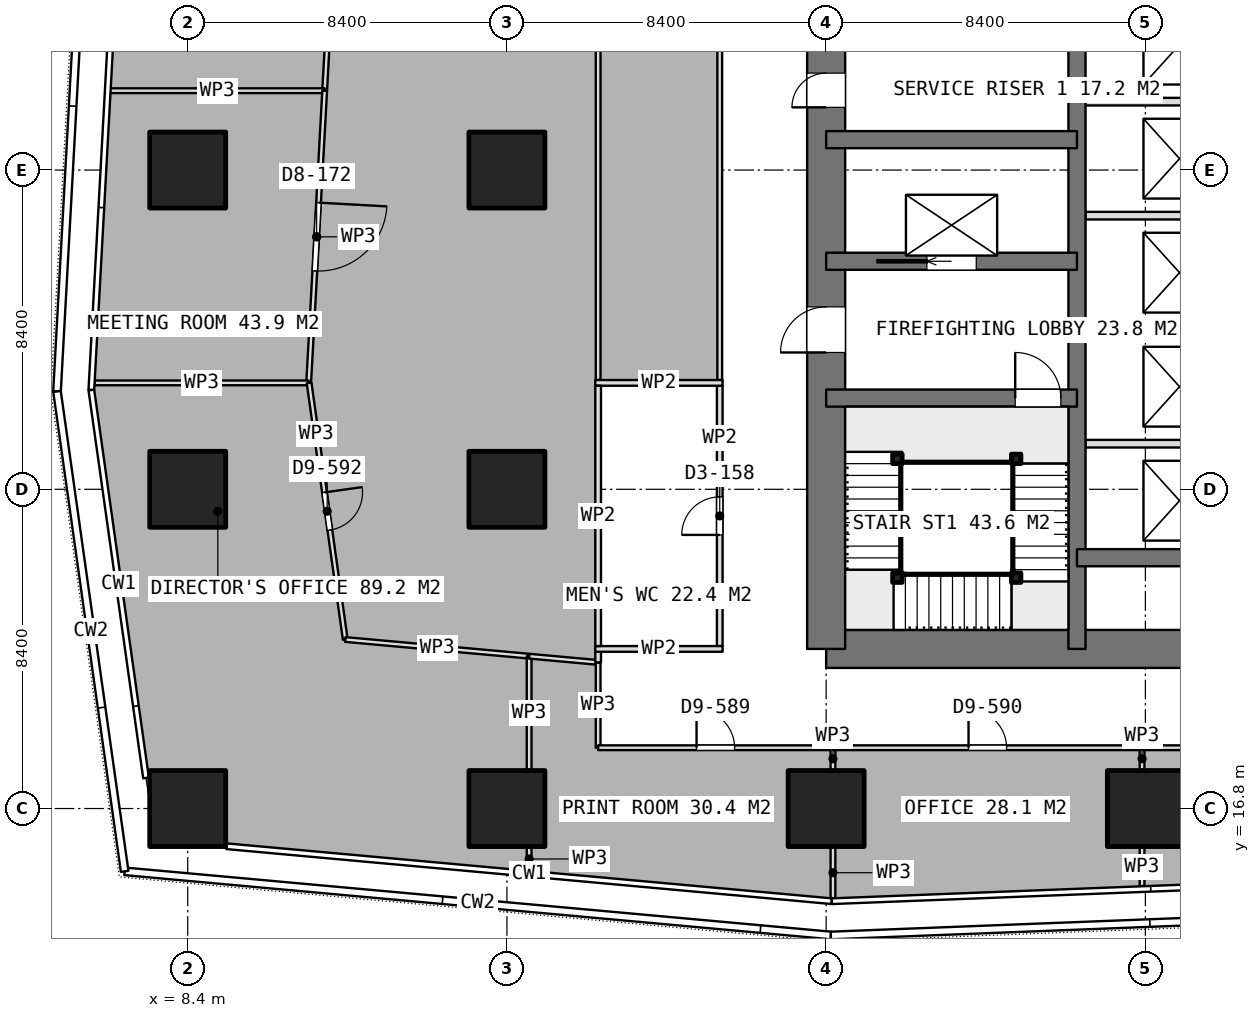
"""IFC4 building model, lengths in metres.
Left out: names, types, materials, properties, quantities, classifications, styles, units other than length and angle.
Written with IfcOpenShell. Run it as: python <this file> out.ifc"""

import sys

from ifc_helpers import new_model, si_unit, direction, frame, frame_2d, origin, origin_2d, place, context, subcontext, project, spatial, rectangle, extrude, element, fill, save


model = new_model("IFC4")
c1 = context("Model", 3, precision=1e-05, world=origin(), true_north=direction((0.0, 1.0)))
c2 = subcontext(c1, "Body", "Model", "MODEL_VIEW")
j1 = project(units=[si_unit("LENGTHUNIT", "METRE"), si_unit("PLANEANGLEUNIT", "RADIAN")], contexts=[c1])
p1 = place(None, origin())
s1 = spatial("IfcSite", under=j1, at=p1, CompositionType="ELEMENT")
p2 = place(p1, origin())
s2 = spatial("IfcBuilding", under=s1, at=p2, CompositionType="ELEMENT")
p3 = place(p2, frame((0.0, 0.0, 147.8)))
s3 = spatial("IfcBuildingStorey", under=s2, at=p3, CompositionType="ELEMENT", Elevation=147.8)
p4 = place(p3, frame((25.2, 21.0, 0.0), z_axis=(0.0, 0.0, 1.0), x_axis=(1.0, 0.0, 0.0)))
e1 = element("IfcWall", 1, at=p4, inside=s3, PredefinedType="SHEAR", context=c2, shape_type="SweptSolid", body=[
    extrude(rectangle(XDim=10.4, YDim=1.0, at=frame_2d((5.2, 0.0))), origin(), (0.0, 0.0, 1.0), 3.75),
])
p5 = place(p3, frame((25.2, 21.0, 0.0), z_axis=(0.0, 0.0, 1.0), x_axis=(0.0, 1.0, 0.0)))
e2 = element("IfcWall", 2, at=p5, inside=s3, PredefinedType="SHEAR", context=c2, shape_type="SweptSolid", body=[
    extrude(rectangle(XDim=25.2, YDim=1.0, at=frame_2d((12.6, 0.0))), origin(), (0.0, 0.0, 1.0), 3.75),
])
p6 = place(p5, frame((7.8, 0.0, 0.0)))
e3 = element("IfcOpeningElement", 3, at=p6, cuts=e2, PredefinedType="OPENING", context=c2, shape_type="SweptSolid", body=[
    extrude(rectangle(XDim=1.2, YDim=2.1, at=frame_2d((0.6, 1.05))), frame((0.0, 0.51, 0.0), z_axis=(0.0, -1.0, 0.0), x_axis=(1.0, 0.0, 0.0)), (0.0, 0.0, 1.0), 1.02),
])
p7 = place(p5, frame((14.25, 0.0, 0.0)))
e4 = element("IfcOpeningElement", 4, at=p7, cuts=e2, PredefinedType="OPENING", context=c2, shape_type="SweptSolid", body=[
    extrude(rectangle(XDim=0.9, YDim=2.1, at=frame_2d((0.45, 1.05))), frame((0.0, 0.51, 0.0), z_axis=(0.0, -1.0, 0.0), x_axis=(1.0, 0.0, 0.0)), (0.0, 0.0, 1.0), 1.02),
])
p8 = place(p5, frame((16.85, 0.0, 0.0)))
e5 = element("IfcOpeningElement", 5, at=p8, cuts=e2, PredefinedType="OPENING", context=c2, shape_type="SweptSolid", body=[
    extrude(rectangle(XDim=0.9, YDim=2.1, at=frame_2d((0.45, 1.05))), frame((0.0, 0.51, 0.0), z_axis=(0.0, -1.0, 0.0), x_axis=(1.0, 0.0, 0.0)), (0.0, 0.0, 1.0), 1.02),
])
p9 = place(p5, frame((19.025, 0.0, 0.0)))
e6 = element("IfcOpeningElement", 6, at=p9, cuts=e2, PredefinedType="OPENING", context=c2, shape_type="SweptSolid", body=[
    extrude(rectangle(XDim=1.2, YDim=2.1, at=frame_2d((0.6, 1.05))), frame((0.0, 0.51, 0.0), z_axis=(0.0, -1.0, 0.0), x_axis=(1.0, 0.0, 0.0)), (0.0, 0.0, 1.0), 1.02),
])
p10 = place(p3, frame((31.8, 21.0, 0.0), z_axis=(0.0, 0.0, 1.0), x_axis=(0.0, 1.0, 0.0)))
e7 = element("IfcWall", 7, at=p10, inside=s3, PredefinedType="SHEAR", context=c2, shape_type="SweptSolid", body=[
    extrude(rectangle(XDim=25.2, YDim=0.45, at=frame_2d((12.6, 0.0))), origin(), (0.0, 0.0, 1.0), 3.75),
])
p11 = place(p3, frame((31.8, 23.4, 0.0), z_axis=(0.0, 0.0, 1.0), x_axis=(1.0, 0.0, 0.0)))
e8 = element("IfcWall", 8, at=p11, inside=s3, PredefinedType="SHEAR", context=c2, shape_type="SweptSolid", body=[
    extrude(rectangle(XDim=3.8, YDim=0.45, at=frame_2d((1.9, 0.0))), origin(), (0.0, 0.0, 1.0), 3.75),
])
p12 = place(p3, frame((25.2, 27.6, 0.0), z_axis=(0.0, 0.0, 1.0), x_axis=(1.0, 0.0, 0.0)))
e9 = element("IfcWall", 9, at=p12, inside=s3, PredefinedType="SHEAR", context=c2, shape_type="SweptSolid", body=[
    extrude(rectangle(XDim=6.6, YDim=0.45, at=frame_2d((3.3, 0.0))), origin(), (0.0, 0.0, 1.0), 3.75),
])
p13 = place(p12, frame((4.975, 0.0, 0.0)))
e10 = element("IfcOpeningElement", 10, at=p13, cuts=e9, PredefinedType="OPENING", context=c2, shape_type="SweptSolid", body=[
    extrude(rectangle(XDim=1.2, YDim=2.1, at=frame_2d((0.6, 1.05))), frame((0.0, 0.235, 0.0), z_axis=(0.0, -1.0, 0.0), x_axis=(1.0, 0.0, 0.0)), (0.0, 0.0, 1.0), 0.47),
])
p14 = place(p3, frame((25.2, 31.2, 0.0), z_axis=(0.0, 0.0, 1.0), x_axis=(1.0, 0.0, 0.0)))
e11 = element("IfcWall", 11, at=p14, inside=s3, PredefinedType="SHEAR", context=c2, shape_type="SweptSolid", body=[
    extrude(rectangle(XDim=6.6, YDim=0.45, at=frame_2d((3.3, 0.0))), origin(), (0.0, 0.0, 1.0), 3.75),
])
p15 = place(p14, frame((2.65, 0.0, 0.0)))
e12 = element("IfcOpeningElement", 12, at=p15, cuts=e11, PredefinedType="OPENING", context=c2, shape_type="SweptSolid", body=[
    extrude(rectangle(XDim=1.3, YDim=2.1, at=frame_2d((0.65, 1.05))), frame((0.0, 0.235, 0.0), z_axis=(0.0, -1.0, 0.0), x_axis=(1.0, 0.0, 0.0)), (0.0, 0.0, 1.0), 0.47),
])
p16 = place(p3, frame((25.2, 34.4, 0.0), z_axis=(0.0, 0.0, 1.0), x_axis=(1.0, 0.0, 0.0)))
e13 = element("IfcWall", 13, at=p16, inside=s3, PredefinedType="SHEAR", context=c2, shape_type="SweptSolid", body=[
    extrude(rectangle(XDim=6.6, YDim=0.45, at=frame_2d((3.3, 0.0))), origin(), (0.0, 0.0, 1.0), 3.75),
])
for number, where, z_axis, x_axis in (
    (14, (8.4, 16.8, 0.0), (0.0, 0.0, 1.0), (1.0, 0.0, 0.0)),
    (15, (8.4, 25.2, 0.0), (0.0, 0.0, 1.0), (1.0, 0.0, 0.0)),
    (16, (8.4, 33.6, 0.0), (0.0, 0.0, 1.0), (1.0, 0.0, 0.0)),
    (17, (16.8, 16.8, 0.0), (0.0, 0.0, 1.0), (1.0, 0.0, 0.0)),
    (18, (16.8, 25.2, 0.0), (0.0, 0.0, 1.0), (1.0, 0.0, 0.0)),
    (19, (16.8, 33.6, 0.0), (0.0, 0.0, 1.0), (1.0, 0.0, 0.0)),
    (20, (25.2, 16.8, 0.0), (0.0, 0.0, 1.0), (1.0, 0.0, 0.0)),
    (21, (33.6, 16.8, 0.0), (0.0, 0.0, 1.0), (1.0, 0.0, 0.0)),
):
    element("IfcColumn", number, at=place(p3, frame(where, z_axis=z_axis, x_axis=x_axis)), inside=s3, PredefinedType="COLUMN", context=c2, shape_type="SweptSolid", body=[
        extrude(rectangle(XDim=2.0, YDim=2.0, at=origin_2d()), origin(), (0.0, 0.0, 1.0), 3.75),
    ])
for number, where, z_axis, x_axis in (
    (22, (32.025, 26.4, 0.0), (0.0, 0.0, 1.0), (1.0, 0.0, 0.0)),
    (23, (32.025, 29.4, 0.0), (0.0, 0.0, 1.0), (1.0, 0.0, 0.0)),
    (24, (32.025, 32.4, 0.0), (0.0, 0.0, 1.0), (1.0, 0.0, 0.0)),
    (25, (32.025, 35.4, 0.0), (0.0, 0.0, 1.0), (1.0, 0.0, 0.0)),
):
    element("IfcWall", number, at=place(p3, frame(where, z_axis=z_axis, x_axis=x_axis)), inside=s3, PredefinedType="PARTITIONING", context=c2, shape_type="SweptSolid", body=[
        extrude(rectangle(XDim=3.35, YDim=0.2, at=frame_2d((1.675, 0.0))), origin(), (0.0, 0.0, 1.0), 3.5),
    ])
for number, where, z_axis, x_axis in (
    (26, (19.125, 21.0, 0.0), (0.0, 0.0, 1.0), (1.0, 0.0, 0.0)),
    (27, (19.125, 28.0, 0.0), (0.0, 0.0, 1.0), (1.0, 0.0, 0.0)),
):
    element("IfcWall", number, at=place(p3, frame(where, z_axis=z_axis, x_axis=x_axis)), inside=s3, PredefinedType="PARTITIONING", context=c2, shape_type="SweptSolid", body=[
        extrude(rectangle(XDim=3.35, YDim=0.15, at=frame_2d((1.675, 0.0))), origin(), (0.0, 0.0, 1.0), 3.5),
    ])
p17 = place(p3, frame((19.2, 21.075, 0.0), z_axis=(0.0, 0.0, 1.0), x_axis=(0.0, 1.0, 0.0)))
e28 = element("IfcWall", 28, at=p17, inside=s3, PredefinedType="PARTITIONING", context=c2, shape_type="SweptSolid", body=[
    extrude(rectangle(XDim=6.85, YDim=0.15, at=frame_2d((3.425, 0.0))), origin(), (0.0, 0.0, 1.0), 3.5),
])
p18 = place(p3, frame((22.4, 21.075, 0.0), z_axis=(0.0, 0.0, 1.0), x_axis=(0.0, 1.0, 0.0)))
e29 = element("IfcWall", 29, at=p18, inside=s3, PredefinedType="PARTITIONING", context=c2, shape_type="SweptSolid", body=[
    extrude(rectangle(XDim=6.85, YDim=0.15, at=frame_2d((3.425, 0.0))), origin(), (0.0, 0.0, 1.0), 3.5),
])
p19 = place(p18, frame((2.925, 0.0, 0.0)))
e30 = element("IfcOpeningElement", 30, at=p19, cuts=e29, PredefinedType="OPENING", context=c2, shape_type="SweptSolid", body=[
    extrude(rectangle(XDim=1.0, YDim=2.1, at=frame_2d((0.5, 1.05))), frame((0.0, 0.085, 0.0), z_axis=(0.0, -1.0, 0.0), x_axis=(1.0, 0.0, 0.0)), (0.0, 0.0, 1.0), 0.17),
])
p20 = place(p3, frame((12.394, 42.794, 0.0), z_axis=(0.0, 0.0, 1.0), x_axis=(-0.054820208694, -0.998496241715, 0.0)))
e31 = element("IfcWall", 31, at=p20, inside=s3, PredefinedType="PARTITIONING", context=c2, shape_type="SweptSolid", body=[
    extrude(rectangle(XDim=7.117, YDim=0.125, at=frame_2d((3.558, 0.0))), origin(), (0.0, 0.0, 1.0), 3.5),
])
p21 = place(p20, frame((3.058, 0.0, 0.0)))
e32 = element("IfcOpeningElement", 32, at=p21, cuts=e31, PredefinedType="OPENING", context=c2, shape_type="SweptSolid", body=[
    extrude(rectangle(XDim=1.0, YDim=2.1, at=frame_2d((0.5, 1.05))), frame((0.0, 0.073, 0.0), z_axis=(0.0, -1.0, 0.0), x_axis=(1.0, 0.0, 0.0)), (0.0, 0.0, 1.0), 0.145),
])
p22 = place(p3, frame((12.004, 35.688, 0.0), z_axis=(0.0, 0.0, 1.0), x_axis=(-1.0, 0.0, 0.0)))
e33 = element("IfcWall", 33, at=p22, inside=s3, PredefinedType="PARTITIONING", context=c2, shape_type="SweptSolid", body=[
    extrude(rectangle(XDim=5.658, YDim=0.125, at=frame_2d((2.829, 0.0))), origin(), (0.0, 0.0, 1.0), 3.5),
])
p23 = place(p3, frame((12.004, 35.687, 0.0), z_axis=(0.0, 0.0, 1.0), x_axis=(-0.054672599676, -0.998504334915, 0.0)))
e34 = element("IfcWall", 34, at=p23, inside=s3, PredefinedType="PARTITIONING", context=c2, shape_type="SweptSolid", body=[
    extrude(rectangle(XDim=7.698, YDim=0.125, at=frame_2d((3.849, 0.0))), origin(), (0.0, 0.0, 1.0), 3.5),
])
p24 = place(p23, frame((2.949, 0.0, 0.0)))
e35 = element("IfcOpeningElement", 35, at=p24, cuts=e34, PredefinedType="OPENING", context=c2, shape_type="SweptSolid", body=[
    extrude(rectangle(XDim=1.8, YDim=2.1, at=frame_2d((0.9, 1.05))), frame((0.0, 0.073, 0.0), z_axis=(0.0, -1.0, 0.0), x_axis=(1.0, 0.0, 0.0)), (0.0, 0.0, 1.0), 0.145),
])
p25 = place(p3, frame((11.583, 28.0, 0.0), z_axis=(0.0, 0.0, 1.0), x_axis=(-1.0, 0.0, 0.0)))
e36 = element("IfcWall", 36, at=p25, inside=s3, PredefinedType="PARTITIONING", context=c2, shape_type="SweptSolid", body=[
    extrude(rectangle(XDim=5.629, YDim=0.125, at=frame_2d((2.814, 0.0))), origin(), (0.0, 0.0, 1.0), 3.5),
])
p26 = place(p3, frame((11.594, 27.999, 0.0), z_axis=(0.0, 0.0, 1.0), x_axis=(0.139621335816, -0.990204969986, 0.0)))
e37 = element("IfcWall", 37, at=p26, inside=s3, PredefinedType="PARTITIONING", context=c2, shape_type="SweptSolid", body=[
    extrude(rectangle(XDim=6.818, YDim=0.125, at=frame_2d((3.409, 0.0))), origin(), (0.0, 0.0, 1.0), 3.5),
])
p27 = place(p26, frame((2.909, 0.0, 0.0)))
e38 = element("IfcOpeningElement", 38, at=p27, cuts=e37, PredefinedType="OPENING", context=c2, shape_type="SweptSolid", body=[
    extrude(rectangle(XDim=1.0, YDim=2.1, at=frame_2d((0.5, 1.05))), frame((0.0, 0.073, 0.0), z_axis=(0.0, -1.0, 0.0), x_axis=(1.0, 0.0, 0.0)), (0.0, 0.0, 1.0), 0.145),
])
p28 = place(p3, frame((12.546, 21.248, 0.0), z_axis=(0.0, 0.0, 1.0), x_axis=(0.995909256007, -0.090359027214, 0.0)))
e39 = element("IfcWall", 39, at=p28, inside=s3, PredefinedType="PARTITIONING", context=c2, shape_type="SweptSolid", body=[
    extrude(rectangle(XDim=4.858, YDim=0.125, at=frame_2d((2.429, 0.0))), origin(), (0.0, 0.0, 1.0), 3.5),
])
p29 = place(p3, frame((17.384, 20.809, 0.0), z_axis=(0.0, 0.0, 1.0), x_axis=(0.0, -1.0, 0.0)))
e40 = element("IfcWall", 40, at=p29, inside=s3, PredefinedType="PARTITIONING", context=c2, shape_type="SweptSolid", body=[
    extrude(rectangle(XDim=2.989, YDim=0.125, at=frame_2d((1.495, 0.0))), origin(), (0.0, 0.0, 1.0), 3.5),
])
p30 = place(p3, frame((17.384, 15.78, 0.0), z_axis=(0.0, 0.0, 1.0), x_axis=(0.0, -1.0, 0.0)))
e41 = element("IfcWall", 41, at=p30, inside=s3, PredefinedType="PARTITIONING", context=c2, shape_type="SweptSolid", body=[
    extrude(rectangle(XDim=0.614, YDim=0.125, at=frame_2d((0.307, 0.0))), origin(), (0.0, 0.0, 1.0), 3.5),
])
p31 = place(p3, frame((17.385, 20.809, 0.0), z_axis=(0.0, 0.0, 1.0), x_axis=(0.995891010038, -0.090559903522, 0.0)))
e42 = element("IfcWall", 42, at=p31, inside=s3, PredefinedType="PARTITIONING", context=c2, shape_type="SweptSolid", body=[
    extrude(rectangle(XDim=1.823, YDim=0.125, at=frame_2d((0.911, 0.0))), origin(), (0.0, 0.0, 1.0), 3.5),
])
p32 = place(p3, frame((19.2, 20.644, 0.0), z_axis=(0.0, 0.0, 1.0), x_axis=(0.0, -1.0, 0.0)))
e43 = element("IfcWall", 43, at=p32, inside=s3, PredefinedType="PARTITIONING", context=c2, shape_type="SweptSolid", body=[
    extrude(rectangle(XDim=2.244, YDim=0.125, at=frame_2d((1.122, 0.0))), origin(), (0.0, 0.0, 1.0), 3.5),
])
p33 = place(p3, frame((19.2, 18.4, 0.0), z_axis=(0.0, 0.0, 1.0), x_axis=(1.0, 0.0, 0.0)))
e44 = element("IfcWall", 44, at=p33, inside=s3, PredefinedType="PARTITIONING", context=c2, shape_type="SweptSolid", body=[
    extrude(rectangle(XDim=6.179, YDim=0.125, at=frame_2d((3.089, 0.0))), origin(), (0.0, 0.0, 1.0), 3.5),
])
p34 = place(p33, frame((2.59, 0.0, 0.0)))
e45 = element("IfcOpeningElement", 45, at=p34, cuts=e44, PredefinedType="OPENING", context=c2, shape_type="SweptSolid", body=[
    extrude(rectangle(XDim=1.0, YDim=2.1, at=frame_2d((0.5, 1.05))), frame((0.0, 0.073, 0.0), z_axis=(0.0, -1.0, 0.0), x_axis=(1.0, 0.0, 0.0)), (0.0, 0.0, 1.0), 0.145),
])
p35 = place(p3, frame((25.379, 18.4, 0.0), z_axis=(0.0, 0.0, 1.0), x_axis=(0.0, -1.0, 0.0)))
e46 = element("IfcWall", 46, at=p35, inside=s3, PredefinedType="PARTITIONING", context=c2, shape_type="SweptSolid", body=[
    extrude(rectangle(XDim=0.58, YDim=0.125, at=frame_2d((0.29, 0.0))), origin(), (0.0, 0.0, 1.0), 3.5),
])
p36 = place(p3, frame((25.379, 15.78, 0.0), z_axis=(0.0, 0.0, 1.0), x_axis=(0.0, -1.0, 0.0)))
e47 = element("IfcWall", 47, at=p36, inside=s3, PredefinedType="PARTITIONING", context=c2, shape_type="SweptSolid", body=[
    extrude(rectangle(XDim=1.337, YDim=0.125, at=frame_2d((0.668, 0.0))), origin(), (0.0, 0.0, 1.0), 3.5),
])
p37 = place(p3, frame((25.38, 18.4, 0.0), z_axis=(0.0, 0.0, 1.0), x_axis=(1.0, 0.0, 0.0)))
e48 = element("IfcWall", 48, at=p37, inside=s3, PredefinedType="PARTITIONING", context=c2, shape_type="SweptSolid", body=[
    extrude(rectangle(XDim=8.133, YDim=0.125, at=frame_2d((4.066, 0.0))), origin(), (0.0, 0.0, 1.0), 3.5),
])
p38 = place(p37, frame((3.567, 0.0, 0.0)))
e49 = element("IfcOpeningElement", 49, at=p38, cuts=e48, PredefinedType="OPENING", context=c2, shape_type="SweptSolid", body=[
    extrude(rectangle(XDim=1.0, YDim=2.1, at=frame_2d((0.5, 1.05))), frame((0.0, 0.073, 0.0), z_axis=(0.0, -1.0, 0.0), x_axis=(1.0, 0.0, 0.0)), (0.0, 0.0, 1.0), 0.145),
])
p39 = place(p3, frame((33.513, 18.4, 0.0), z_axis=(0.0, 0.0, 1.0), x_axis=(0.0, -1.0, 0.0)))
e50 = element("IfcWall", 50, at=p39, inside=s3, PredefinedType="PARTITIONING", context=c2, shape_type="SweptSolid", body=[
    extrude(rectangle(XDim=0.58, YDim=0.125, at=frame_2d((0.29, 0.0))), origin(), (0.0, 0.0, 1.0), 3.5),
])
p40 = place(p3, frame((33.513, 15.78, 0.0), z_axis=(0.0, 0.0, 1.0), x_axis=(0.0, -1.0, 0.0)))
e51 = element("IfcWall", 51, at=p40, inside=s3, PredefinedType="PARTITIONING", context=c2, shape_type="SweptSolid", body=[
    extrude(rectangle(XDim=1.02, YDim=0.125, at=frame_2d((0.51, 0.0))), origin(), (0.0, 0.0, 1.0), 3.5),
])
p41 = place(p3, frame((22.4, 52.9, 0.0), z_axis=(0.0, 0.0, 1.0), x_axis=(0.0, -1.0, 0.0)))
e52 = element("IfcWall", 52, at=p41, inside=s3, PredefinedType="PARTITIONING", context=c2, shape_type="SweptSolid", body=[
    extrude(rectangle(XDim=24.825, YDim=0.125, at=frame_2d((12.413, 0.0))), origin(), (0.0, 0.0, 1.0), 3.5),
])
p42 = place(p41, frame((11.55, 0.0, 0.0)))
e53 = element("IfcOpeningElement", 53, at=p42, cuts=e52, PredefinedType="OPENING", context=c2, shape_type="SweptSolid", body=[
    extrude(rectangle(XDim=1.8, YDim=2.1, at=frame_2d((0.9, 1.05))), frame((0.0, 0.073, 0.0), z_axis=(0.0, -1.0, 0.0), x_axis=(1.0, 0.0, 0.0)), (0.0, 0.0, 1.0), 0.145),
])
p43 = place(p3, frame((19.2, 28.075, 0.0), z_axis=(0.0, 0.0, 1.0), x_axis=(0.0, 1.0, 0.0)))
e54 = element("IfcWall", 54, at=p43, inside=s3, PredefinedType="PARTITIONING", context=c2, shape_type="SweptSolid", body=[
    extrude(rectangle(XDim=27.063, YDim=0.125, at=frame_2d((13.531, 0.0))), origin(), (0.0, 0.0, 1.0), 3.5),
])
p44 = place(p43, frame((12.025, 0.0, 0.0)))
e55 = element("IfcOpeningElement", 55, at=p44, cuts=e54, PredefinedType="OPENING", context=c2, shape_type="SweptSolid", body=[
    extrude(rectangle(XDim=1.0, YDim=2.1, at=frame_2d((0.5, 1.05))), frame((0.0, 0.073, 0.0), z_axis=(0.0, -1.0, 0.0), x_axis=(1.0, 0.0, 0.0)), (0.0, 0.0, 1.0), 0.145),
])
p45 = place(p3, frame((19.2, 21.075, 0.0), z_axis=(0.0, 0.0, 1.0), x_axis=(0.0, -1.0, 0.0)))
e56 = element("IfcWall", 56, at=p45, inside=s3, PredefinedType="PARTITIONING", context=c2, shape_type="SweptSolid", body=[
    extrude(rectangle(XDim=0.431, YDim=0.15, at=frame_2d((0.215, 0.0))), origin(), (0.0, 0.0, 1.0), 3.5),
])
p46 = place(p3, frame((33.513, 18.4, 0.0), z_axis=(0.0, 0.0, 1.0), x_axis=(1.0, 0.0, 0.0)))
e57 = element("IfcWall", 57, at=p46, inside=s3, PredefinedType="PARTITIONING", context=c2, shape_type="SweptSolid", body=[
    extrude(rectangle(XDim=15.666, YDim=0.125, at=frame_2d((7.833, 0.0))), origin(), (0.0, 0.0, 1.0), 3.5),
])
p47 = place(p46, frame((5.633, 0.0, 0.0)))
e58 = element("IfcOpeningElement", 58, at=p47, cuts=e57, PredefinedType="OPENING", context=c2, shape_type="SweptSolid", body=[
    extrude(rectangle(XDim=1.8, YDim=2.1, at=frame_2d((0.9, 1.05))), frame((0.0, 0.073, 0.0), z_axis=(0.0, -1.0, 0.0), x_axis=(1.0, 0.0, 0.0)), (0.0, 0.0, 1.0), 0.145),
])
for number, where, z_axis, x_axis in (
    (59, (30.2, 26.0, 0.0), (0.0, 0.0, 1.0), (1.0, 0.0, 0.0)),
    (60, (30.2, 22.875, 0.0), (0.0, 0.0, 1.0), (1.0, 0.0, 0.0)),
    (61, (27.075, 22.875, 0.0), (0.0, 0.0, 1.0), (1.0, 0.0, 0.0)),
    (62, (27.075, 26.0, 0.0), (0.0, 0.0, 1.0), (1.0, 0.0, 0.0)),
):
    element("IfcColumn", number, at=place(p3, frame(where, z_axis=z_axis, x_axis=x_axis)), inside=s3, PredefinedType="COLUMN", context=c2, shape_type="SweptSolid", body=[
        extrude(rectangle(XDim=0.25, YDim=0.25, at=origin_2d()), origin(), (0.0, 0.0, 1.0), 3.75),
    ])
p48 = place(p6, origin())
e63 = element("IfcDoor", 63, at=p48, inside=s3, OperationType="SINGLE_SWING_LEFT", PredefinedType="DOOR", context=c2, shape_type="SweptSolid", body=[
    extrude(rectangle(XDim=1.2, YDim=2.1, at=frame_2d((0.6, 1.05))), frame((0.0, 0.025, 0.0), z_axis=(0.0, -1.0, 0.0), x_axis=(1.0, 0.0, 0.0)), (0.0, 0.0, 1.0), 0.05),
])
fill(e3, e63)
p49 = place(p7, origin())
e64 = element("IfcDoor", 64, at=p49, inside=s3, OperationType="SINGLE_SWING_LEFT", PredefinedType="DOOR", context=c2, shape_type="SweptSolid", body=[
    extrude(rectangle(XDim=0.9, YDim=2.1, at=frame_2d((0.45, 1.05))), frame((0.0, 0.025, 0.0), z_axis=(0.0, -1.0, 0.0), x_axis=(1.0, 0.0, 0.0)), (0.0, 0.0, 1.0), 0.05),
])
fill(e4, e64)
p50 = place(p15, origin())
e65 = element("IfcDoor", 65, at=p50, inside=s3, OperationType="SLIDING_TO_LEFT", PredefinedType="USERDEFINED", context=c2, shape_type="SweptSolid", body=[
    extrude(rectangle(XDim=1.3, YDim=2.1, at=frame_2d((0.65, 1.05))), frame((0.0, 0.025, 0.0), z_axis=(0.0, -1.0, 0.0), x_axis=(1.0, 0.0, 0.0)), (0.0, 0.0, 1.0), 0.05),
])
fill(e12, e65)
p51 = place(p19, origin())
e66 = element("IfcDoor", 66, at=p51, inside=s3, OperationType="SINGLE_SWING_LEFT", PredefinedType="DOOR", context=c2, shape_type="SweptSolid", body=[
    extrude(rectangle(XDim=1.0, YDim=2.1, at=frame_2d((0.5, 1.05))), frame((0.0, 0.025, 0.0), z_axis=(0.0, -1.0, 0.0), x_axis=(1.0, 0.0, 0.0)), (0.0, 0.0, 1.0), 0.05),
])
fill(e30, e66)
p52 = place(p24, origin())
e67 = element("IfcDoor", 67, at=p52, inside=s3, OperationType="DOUBLE_DOOR_SINGLE_SWING", PredefinedType="DOOR", context=c2, shape_type="SweptSolid", body=[
    extrude(rectangle(XDim=1.8, YDim=2.1, at=frame_2d((0.9, 1.05))), frame((0.0, 0.025, 0.0), z_axis=(0.0, -1.0, 0.0), x_axis=(1.0, 0.0, 0.0)), (0.0, 0.0, 1.0), 0.05),
])
fill(e35, e67)
p53 = place(p27, origin())
e68 = element("IfcDoor", 68, at=p53, inside=s3, OperationType="SINGLE_SWING_LEFT", PredefinedType="DOOR", context=c2, shape_type="SweptSolid", body=[
    extrude(rectangle(XDim=1.0, YDim=2.1, at=frame_2d((0.5, 1.05))), frame((0.0, 0.025, 0.0), z_axis=(0.0, -1.0, 0.0), x_axis=(1.0, 0.0, 0.0)), (0.0, 0.0, 1.0), 0.05),
])
fill(e38, e68)
p54 = place(p34, origin())
e69 = element("IfcDoor", 69, at=p54, inside=s3, OperationType="SINGLE_SWING_LEFT", PredefinedType="DOOR", context=c2, shape_type="SweptSolid", body=[
    extrude(rectangle(XDim=1.0, YDim=2.1, at=frame_2d((0.5, 1.05))), frame((0.0, 0.025, 0.0), z_axis=(0.0, -1.0, 0.0), x_axis=(1.0, 0.0, 0.0)), (0.0, 0.0, 1.0), 0.05),
])
fill(e45, e69)
p55 = place(p38, origin())
e70 = element("IfcDoor", 70, at=p55, inside=s3, OperationType="SINGLE_SWING_LEFT", PredefinedType="DOOR", context=c2, shape_type="SweptSolid", body=[
    extrude(rectangle(XDim=1.0, YDim=2.1, at=frame_2d((0.5, 1.05))), frame((0.0, 0.025, 0.0), z_axis=(0.0, -1.0, 0.0), x_axis=(1.0, 0.0, 0.0)), (0.0, 0.0, 1.0), 0.05),
])
fill(e49, e70)
p56 = place(p13, origin())
e71 = element("IfcDoor", 71, at=p56, inside=s3, OperationType="SINGLE_SWING_RIGHT", PredefinedType="DOOR", context=c2, shape_type="SweptSolid", body=[
    extrude(rectangle(XDim=1.2, YDim=2.1, at=frame_2d((0.6, 1.05))), frame((0.0, 0.025, 0.0), z_axis=(0.0, -1.0, 0.0), x_axis=(1.0, 0.0, 0.0)), (0.0, 0.0, 1.0), 0.05),
])
fill(e10, e71)
save(model, sys.argv[1])
